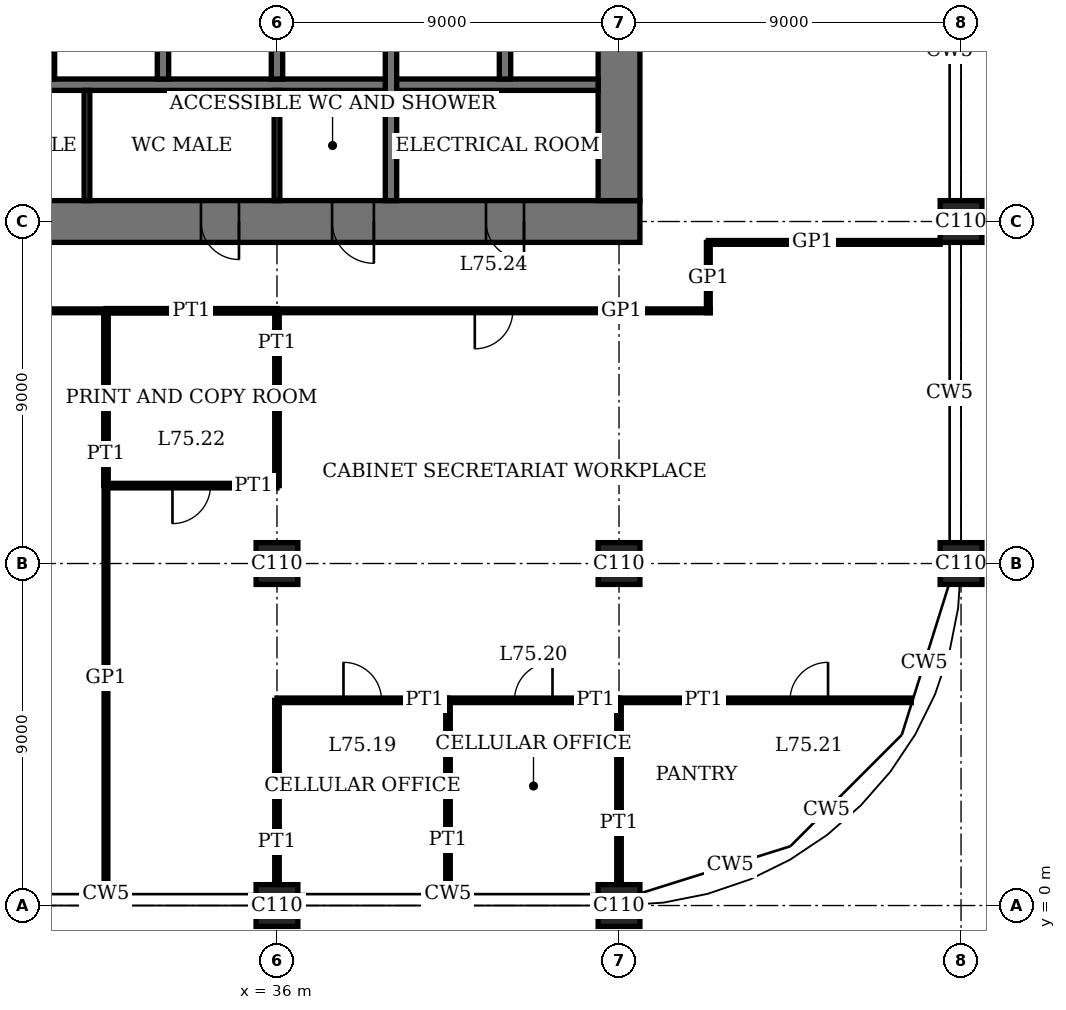
"""IFC4 building model, lengths in metres.
Left out: names, types, materials, properties, quantities, classifications, styles, units other than length and angle.
Written with IfcOpenShell. Run it as: python <this file> out.ifc"""

import sys

from ifc_helpers import new_model, si_unit, direction, frame, frame_2d, origin, origin_2d, place, context, subcontext, project, spatial, rectangle, extrude, element, fill, save


model = new_model("IFC4")
c1 = context("Model", 3, precision=1e-05, world=origin(), true_north=direction((0.0, 1.0)))
c2 = subcontext(c1, "Body", "Model", "MODEL_VIEW")
j1 = project(units=[si_unit("LENGTHUNIT", "METRE"), si_unit("PLANEANGLEUNIT", "RADIAN")], contexts=[c1])
p1 = place(None, origin())
s1 = spatial("IfcSite", under=j1, at=p1, CompositionType="ELEMENT")
p2 = place(p1, origin())
s2 = spatial("IfcBuilding", under=s1, at=p2, CompositionType="ELEMENT")
p3 = place(p2, frame((0.0, 0.0, 307.4)))
s3 = spatial("IfcBuildingStorey", under=s2, at=p3, CompositionType="ELEMENT", Elevation=307.4)
for number, where, z_axis, x_axis in (
    (1, (36.0, 0.0, 0.0), (0.0, 0.0, 1.0), (1.0, 0.0, 0.0)),
    (2, (36.0, 9.0, 0.0), (0.0, 0.0, 1.0), (1.0, 0.0, 0.0)),
    (3, (45.0, 0.0, 0.0), (0.0, 0.0, 1.0), (1.0, 0.0, 0.0)),
    (4, (45.0, 9.0, 0.0), (0.0, 0.0, 1.0), (1.0, 0.0, 0.0)),
    (5, (54.0, 9.0, 0.0), (0.0, 0.0, 1.0), (1.0, 0.0, 0.0)),
    (6, (54.0, 18.0, 0.0), (0.0, 0.0, 1.0), (1.0, 0.0, 0.0)),
):
    element("IfcColumn", number, at=place(p3, frame(where, z_axis=z_axis, x_axis=x_axis)), inside=s3, PredefinedType="COLUMN", context=c2, shape_type="SweptSolid", body=[
        extrude(rectangle(XDim=1.1, YDim=1.1, at=origin_2d()), origin(), (0.0, 0.0, 1.0), 4.4),
    ])
p4 = place(p3, frame((17.45, 18.0, 0.0), z_axis=(0.0, 0.0, 1.0), x_axis=(1.0, 0.0, 0.0)))
e7 = element("IfcWall", 7, at=p4, inside=s3, PredefinedType="SHEAR", context=c2, shape_type="SweptSolid", body=[
    extrude(rectangle(XDim=28.1, YDim=1.1, at=frame_2d((14.05, 0.0))), origin(), (0.0, 0.0, 1.0), 4.4),
])
p5 = place(p4, frame((11.55, 0.0, 0.0)))
e8 = element("IfcOpeningElement", 8, at=p5, cuts=e7, PredefinedType="OPENING", context=c2, shape_type="SweptSolid", body=[
    extrude(rectangle(XDim=1.0, YDim=2.4, at=frame_2d((0.5, 1.2))), frame((0.0, 0.56, 0.0), z_axis=(0.0, -1.0, 0.0), x_axis=(1.0, 0.0, 0.0)), (0.0, 0.0, 1.0), 1.12),
])
p6 = place(p4, frame((16.55, 0.0, 0.0)))
e9 = element("IfcOpeningElement", 9, at=p6, cuts=e7, PredefinedType="OPENING", context=c2, shape_type="SweptSolid", body=[
    extrude(rectangle(XDim=1.0, YDim=2.4, at=frame_2d((0.5, 1.2))), frame((0.0, 0.56, 0.0), z_axis=(0.0, -1.0, 0.0), x_axis=(1.0, 0.0, 0.0)), (0.0, 0.0, 1.0), 1.12),
])
p7 = place(p4, frame((20.0, 0.0, 0.0)))
e10 = element("IfcOpeningElement", 10, at=p7, cuts=e7, PredefinedType="OPENING", context=c2, shape_type="SweptSolid", body=[
    extrude(rectangle(XDim=1.1, YDim=2.4, at=frame_2d((0.55, 1.2))), frame((0.0, 0.56, 0.0), z_axis=(0.0, -1.0, 0.0), x_axis=(1.0, 0.0, 0.0)), (0.0, 0.0, 1.0), 1.12),
])
p8 = place(p4, frame((24.05, 0.0, 0.0)))
e11 = element("IfcOpeningElement", 11, at=p8, cuts=e7, PredefinedType="OPENING", context=c2, shape_type="SweptSolid", body=[
    extrude(rectangle(XDim=1.0, YDim=2.4, at=frame_2d((0.5, 1.2))), frame((0.0, 0.56, 0.0), z_axis=(0.0, -1.0, 0.0), x_axis=(1.0, 0.0, 0.0)), (0.0, 0.0, 1.0), 1.12),
])
p9 = place(p3, frame((45.0, 18.55, 0.0), z_axis=(0.0, 0.0, 1.0), x_axis=(0.0, 1.0, 0.0)))
e12 = element("IfcWall", 12, at=p9, inside=s3, PredefinedType="SHEAR", context=c2, shape_type="SweptSolid", body=[
    extrude(rectangle(XDim=16.9, YDim=1.1, at=frame_2d((8.45, 0.0))), origin(), (0.0, 0.0, 1.0), 4.4),
])
p10 = place(p9, frame((8.45, 0.0, 0.0)))
e13 = element("IfcOpeningElement", 13, at=p10, cuts=e12, PredefinedType="OPENING", context=c2, shape_type="SweptSolid", body=[
    extrude(rectangle(XDim=1.8, YDim=2.4, at=frame_2d((0.9, 1.2))), frame((0.0, 0.56, 0.0), z_axis=(0.0, -1.0, 0.0), x_axis=(1.0, 0.0, 0.0)), (0.0, 0.0, 1.0), 1.12),
])
p11 = place(p3, frame((27.15, 21.6, 0.0), z_axis=(0.0, 0.0, 1.0), x_axis=(1.0, 0.0, 0.0)))
e14 = element("IfcWall", 14, at=p11, inside=s3, PredefinedType="SHEAR", context=c2, shape_type="SweptSolid", body=[
    extrude(rectangle(XDim=17.3, YDim=0.3, at=frame_2d((8.65, 0.0))), origin(), (0.0, 0.0, 1.0), 4.4),
])
for number, where, z_axis, x_axis in (
    (15, (30.0, 21.75, 0.0), (0.0, 0.0, 1.0), (0.0, 1.0, 0.0)),
    (16, (33.0, 21.75, 0.0), (0.0, 0.0, 1.0), (0.0, 1.0, 0.0)),
    (17, (36.0, 21.75, 0.0), (0.0, 0.0, 1.0), (0.0, 1.0, 0.0)),
):
    element("IfcWall", number, at=place(p3, frame(where, z_axis=z_axis, x_axis=x_axis)), inside=s3, PredefinedType="SHEAR", context=c2, shape_type="SweptSolid", body=[
        extrude(rectangle(XDim=2.7, YDim=0.3, at=frame_2d((1.35, 0.0))), origin(), (0.0, 0.0, 1.0), 4.4),
    ])
p12 = place(p3, frame((39.0, 18.55, 0.0), z_axis=(0.0, 0.0, 1.0), x_axis=(0.0, 1.0, 0.0)))
e18 = element("IfcWall", 18, at=p12, inside=s3, PredefinedType="SHEAR", context=c2, shape_type="SweptSolid", body=[
    extrude(rectangle(XDim=5.9, YDim=0.3, at=frame_2d((2.95, 0.0))), origin(), (0.0, 0.0, 1.0), 4.4),
])
p13 = place(p3, frame((42.0, 21.75, 0.0), z_axis=(0.0, 0.0, 1.0), x_axis=(0.0, 1.0, 0.0)))
e19 = element("IfcWall", 19, at=p13, inside=s3, PredefinedType="SHEAR", context=c2, shape_type="SweptSolid", body=[
    extrude(rectangle(XDim=2.7, YDim=0.3, at=frame_2d((1.35, 0.0))), origin(), (0.0, 0.0, 1.0), 4.4),
])
p14 = place(p3, frame((36.0, 5.4, 0.0), z_axis=(0.0, 0.0, 1.0), x_axis=(1.0, 0.0, 0.0)))
e20 = element("IfcWall", 20, at=p14, inside=s3, PredefinedType="PARTITIONING", context=c2, shape_type="SweptSolid", body=[
    extrude(rectangle(XDim=4.5, YDim=0.12, at=frame_2d((2.25, 0.0))), origin(), (0.0, 0.0, 1.0), 4.05),
])
p15 = place(p14, frame((1.75, 0.0, 0.0)))
e21 = element("IfcOpeningElement", 21, at=p15, cuts=e20, PredefinedType="OPENING", context=c2, shape_type="SweptSolid", body=[
    extrude(rectangle(XDim=1.0, YDim=2.4, at=frame_2d((0.5, 1.2))), frame((0.0, 0.07, 0.0), z_axis=(0.0, -1.0, 0.0), x_axis=(1.0, 0.0, 0.0)), (0.0, 0.0, 1.0), 0.14),
])
p16 = place(p3, frame((40.5, 5.4, 0.0), z_axis=(0.0, 0.0, 1.0), x_axis=(1.0, 0.0, 0.0)))
e22 = element("IfcWall", 22, at=p16, inside=s3, PredefinedType="PARTITIONING", context=c2, shape_type="SweptSolid", body=[
    extrude(rectangle(XDim=4.5, YDim=0.12, at=frame_2d((2.25, 0.0))), origin(), (0.0, 0.0, 1.0), 4.05),
])
p17 = place(p16, frame((1.75, 0.0, 0.0)))
e23 = element("IfcOpeningElement", 23, at=p17, cuts=e22, PredefinedType="OPENING", context=c2, shape_type="SweptSolid", body=[
    extrude(rectangle(XDim=1.0, YDim=2.4, at=frame_2d((0.5, 1.2))), frame((0.0, 0.07, 0.0), z_axis=(0.0, -1.0, 0.0), x_axis=(1.0, 0.0, 0.0)), (0.0, 0.0, 1.0), 0.14),
])
p18 = place(p3, frame((45.0, 5.4, 0.0), z_axis=(0.0, 0.0, 1.0), x_axis=(1.0, 0.0, 0.0)))
e24 = element("IfcWall", 24, at=p18, inside=s3, PredefinedType="PARTITIONING", context=c2, shape_type="SweptSolid", body=[
    extrude(rectangle(XDim=7.69, YDim=0.12, at=frame_2d((3.845, 0.0))), origin(), (0.0, 0.0, 1.0), 4.05),
])
p19 = place(p18, frame((4.5, 0.0, 0.0)))
e25 = element("IfcOpeningElement", 25, at=p19, cuts=e24, PredefinedType="OPENING", context=c2, shape_type="SweptSolid", body=[
    extrude(rectangle(XDim=1.0, YDim=2.4, at=frame_2d((0.5, 1.2))), frame((0.0, 0.07, 0.0), z_axis=(0.0, -1.0, 0.0), x_axis=(1.0, 0.0, 0.0)), (0.0, 0.0, 1.0), 0.14),
])
p20 = place(p3, frame((31.5, 11.05, 0.0), z_axis=(0.0, 0.0, 1.0), x_axis=(1.0, 0.0, 0.0)))
e26 = element("IfcWall", 26, at=p20, inside=s3, PredefinedType="PARTITIONING", context=c2, shape_type="SweptSolid", body=[
    extrude(rectangle(XDim=4.5, YDim=0.12, at=frame_2d((2.25, 0.0))), origin(), (0.0, 0.0, 1.0), 4.05),
])
p21 = place(p20, frame((1.75, 0.0, 0.0)))
e27 = element("IfcOpeningElement", 27, at=p21, cuts=e26, PredefinedType="OPENING", context=c2, shape_type="SweptSolid", body=[
    extrude(rectangle(XDim=1.0, YDim=2.4, at=frame_2d((0.5, 1.2))), frame((0.0, 0.07, 0.0), z_axis=(0.0, -1.0, 0.0), x_axis=(1.0, 0.0, 0.0)), (0.0, 0.0, 1.0), 0.14),
])
p22 = place(p3, frame((31.5, 15.65, 0.0), z_axis=(0.0, 0.0, 1.0), x_axis=(1.0, 0.0, 0.0)))
e28 = element("IfcWall", 28, at=p22, inside=s3, PredefinedType="PARTITIONING", context=c2, shape_type="SweptSolid", body=[
    extrude(rectangle(XDim=4.5, YDim=0.12, at=frame_2d((2.25, 0.0))), origin(), (0.0, 0.0, 1.0), 4.05),
])
p23 = place(p3, frame((15.6, 15.65, 0.0), z_axis=(0.0, 0.0, 1.0), x_axis=(1.0, 0.0, 0.0)))
e29 = element("IfcWall", 29, at=p23, inside=s3, PredefinedType="PARTITIONING", context=c2, shape_type="SweptSolid", body=[
    extrude(rectangle(XDim=15.89, YDim=0.1, at=frame_2d((7.945, 0.0))), origin(), (0.0, 0.0, 1.0), 4.05),
])
p24 = place(p23, frame((7.445, 0.0, 0.0)))
e30 = element("IfcOpeningElement", 30, at=p24, cuts=e29, PredefinedType="OPENING", context=c2, shape_type="SweptSolid", body=[
    extrude(rectangle(XDim=1.0, YDim=2.4, at=frame_2d((0.5, 1.2))), frame((0.0, 0.06, 0.0), z_axis=(0.0, -1.0, 0.0), x_axis=(1.0, 0.0, 0.0)), (0.0, 0.0, 1.0), 0.12),
])
p25 = place(p3, frame((36.01, 15.65, 0.0), z_axis=(0.0, 0.0, 1.0), x_axis=(1.0, 0.0, 0.0)))
e31 = element("IfcWall", 31, at=p25, inside=s3, PredefinedType="PARTITIONING", context=c2, shape_type="SweptSolid", body=[
    extrude(rectangle(XDim=11.39, YDim=0.1, at=frame_2d((5.695, 0.0))), origin(), (0.0, 0.0, 1.0), 4.05),
])
p26 = place(p25, frame((5.195, 0.0, 0.0)))
e32 = element("IfcOpeningElement", 32, at=p26, cuts=e31, PredefinedType="OPENING", context=c2, shape_type="SweptSolid", body=[
    extrude(rectangle(XDim=1.0, YDim=2.4, at=frame_2d((0.5, 1.2))), frame((0.0, 0.06, 0.0), z_axis=(0.0, -1.0, 0.0), x_axis=(1.0, 0.0, 0.0)), (0.0, 0.0, 1.0), 0.12),
])
p27 = place(p3, frame((47.35, 17.45, 0.0), z_axis=(0.0, 0.0, 1.0), x_axis=(1.0, 0.0, 0.0)))
e33 = element("IfcWall", 33, at=p27, inside=s3, PredefinedType="PARTITIONING", context=c2, shape_type="SweptSolid", body=[
    extrude(rectangle(XDim=6.1, YDim=0.1, at=frame_2d((3.05, 0.0))), origin(), (0.0, 0.0, 1.0), 4.05),
])
p28 = place(p3, frame((31.5, 11.05, 0.0), z_axis=(0.0, 0.0, 1.0), x_axis=(0.0, 1.0, 0.0)))
e34 = element("IfcWall", 34, at=p28, inside=s3, PredefinedType="PARTITIONING", context=c2, shape_type="SweptSolid", body=[
    extrude(rectangle(XDim=4.6, YDim=0.12, at=frame_2d((2.3, 0.0))), origin(), (0.0, 0.0, 1.0), 4.05),
])
p29 = place(p3, frame((31.5, 0.31, 0.0), z_axis=(0.0, 0.0, 1.0), x_axis=(0.0, 1.0, 0.0)))
e35 = element("IfcWall", 35, at=p29, inside=s3, PredefinedType="PARTITIONING", context=c2, shape_type="SweptSolid", body=[
    extrude(rectangle(XDim=10.74, YDim=0.1, at=frame_2d((5.37, 0.0))), origin(), (0.0, 0.0, 1.0), 4.05),
])
p30 = place(p3, frame((36.0, 0.55, 0.0), z_axis=(0.0, 0.0, 1.0), x_axis=(0.0, 1.0, 0.0)))
e36 = element("IfcWall", 36, at=p30, inside=s3, PredefinedType="PARTITIONING", context=c2, shape_type="SweptSolid", body=[
    extrude(rectangle(XDim=4.85, YDim=0.12, at=frame_2d((2.425, 0.0))), origin(), (0.0, 0.0, 1.0), 3.25),
])
p31 = place(p3, frame((36.0, 11.05, 0.0), z_axis=(0.0, 0.0, 1.0), x_axis=(0.0, 1.0, 0.0)))
e37 = element("IfcWall", 37, at=p31, inside=s3, PredefinedType="PARTITIONING", context=c2, shape_type="SweptSolid", body=[
    extrude(rectangle(XDim=4.6, YDim=0.12, at=frame_2d((2.3, 0.0))), origin(), (0.0, 0.0, 1.0), 3.25),
])
p32 = place(p3, frame((40.5, 0.31, 0.0), z_axis=(0.0, 0.0, 1.0), x_axis=(0.0, 1.0, 0.0)))
e38 = element("IfcWall", 38, at=p32, inside=s3, PredefinedType="PARTITIONING", context=c2, shape_type="SweptSolid", body=[
    extrude(rectangle(XDim=5.09, YDim=0.12, at=frame_2d((2.545, 0.0))), origin(), (0.0, 0.0, 1.0), 4.05),
])
p33 = place(p3, frame((45.0, 0.55, 0.0), z_axis=(0.0, 0.0, 1.0), x_axis=(0.0, 1.0, 0.0)))
e39 = element("IfcWall", 39, at=p33, inside=s3, PredefinedType="PARTITIONING", context=c2, shape_type="SweptSolid", body=[
    extrude(rectangle(XDim=4.85, YDim=0.12, at=frame_2d((2.425, 0.0))), origin(), (0.0, 0.0, 1.0), 3.25),
])
p34 = place(p3, frame((47.35, 15.6, 0.0), z_axis=(0.0, 0.0, 1.0), x_axis=(0.0, 1.0, 0.0)))
e40 = element("IfcWall", 40, at=p34, inside=s3, PredefinedType="PARTITIONING", context=c2, shape_type="SweptSolid", body=[
    extrude(rectangle(XDim=1.85, YDim=0.1, at=frame_2d((0.925, 0.0))), origin(), (0.0, 0.0, 1.0), 4.05),
])
for number, where, z_axis, x_axis in (
    (41, (31.0, 18.55, 0.0), (0.0, 0.0, 1.0), (0.0, 1.0, 0.0)),
    (42, (36.0, 18.55, 0.0), (0.0, 0.0, 1.0), (0.0, 1.0, 0.0)),
):
    element("IfcWall", number, at=place(p3, frame(where, z_axis=z_axis, x_axis=x_axis)), inside=s3, PredefinedType="PARTITIONING", context=c2, shape_type="SweptSolid", body=[
        extrude(rectangle(XDim=2.9, YDim=0.15, at=frame_2d((1.45, 0.0))), origin(), (0.0, 0.0, 1.0), 4.05),
    ])
p35 = place(p6, origin())
e43 = element("IfcDoor", 43, at=p35, inside=s3, OperationType="SINGLE_SWING_RIGHT", PredefinedType="DOOR", context=c2, shape_type="SweptSolid", body=[
    extrude(rectangle(XDim=1.0, YDim=2.4, at=frame_2d((0.5, 1.2))), frame((0.0, 0.025, 0.0), z_axis=(0.0, -1.0, 0.0), x_axis=(1.0, 0.0, 0.0)), (0.0, 0.0, 1.0), 0.05),
    extrude(rectangle(XDim=0.04, YDim=2.4, at=frame_2d((0.02, 1.2))), frame((0.0, 0.4, 0.0), z_axis=(0.0, -1.0, 0.0), x_axis=(1.0, 0.0, 0.0)), (0.0, 0.0, 1.0), 0.8),
    extrude(rectangle(XDim=0.04, YDim=2.4, at=frame_2d((0.98, 1.2))), frame((0.0, 0.4, 0.0), z_axis=(0.0, -1.0, 0.0), x_axis=(1.0, 0.0, 0.0)), (0.0, 0.0, 1.0), 0.8),
    extrude(rectangle(XDim=1.0, YDim=0.04, at=frame_2d((0.5, 2.38))), frame((0.0, 0.4, 0.0), z_axis=(0.0, -1.0, 0.0), x_axis=(1.0, 0.0, 0.0)), (0.0, 0.0, 1.0), 0.8),
])
fill(e9, e43)
p36 = place(p7, origin())
e44 = element("IfcDoor", 44, at=p36, inside=s3, OperationType="SINGLE_SWING_RIGHT", PredefinedType="DOOR", context=c2, shape_type="SweptSolid", body=[
    extrude(rectangle(XDim=1.1, YDim=2.4, at=frame_2d((0.55, 1.2))), frame((0.0, 0.025, 0.0), z_axis=(0.0, -1.0, 0.0), x_axis=(1.0, 0.0, 0.0)), (0.0, 0.0, 1.0), 0.05),
    extrude(rectangle(XDim=0.04, YDim=2.4, at=frame_2d((0.02, 1.2))), frame((0.0, 0.44, 0.0), z_axis=(0.0, -1.0, 0.0), x_axis=(1.0, 0.0, 0.0)), (0.0, 0.0, 1.0), 0.88),
    extrude(rectangle(XDim=0.04, YDim=2.4, at=frame_2d((1.08, 1.2))), frame((0.0, 0.44, 0.0), z_axis=(0.0, -1.0, 0.0), x_axis=(1.0, 0.0, 0.0)), (0.0, 0.0, 1.0), 0.88),
    extrude(rectangle(XDim=1.1, YDim=0.04, at=frame_2d((0.55, 2.38))), frame((0.0, 0.44, 0.0), z_axis=(0.0, -1.0, 0.0), x_axis=(1.0, 0.0, 0.0)), (0.0, 0.0, 1.0), 0.88),
])
fill(e10, e44)
p37 = place(p8, origin())
e45 = element("IfcDoor", 45, at=p37, inside=s3, OperationType="SINGLE_SWING_RIGHT", PredefinedType="DOOR", context=c2, shape_type="SweptSolid", body=[
    extrude(rectangle(XDim=1.0, YDim=2.4, at=frame_2d((0.5, 1.2))), frame((0.0, 0.025, 0.0), z_axis=(0.0, -1.0, 0.0), x_axis=(1.0, 0.0, 0.0)), (0.0, 0.0, 1.0), 0.05),
    extrude(rectangle(XDim=0.04, YDim=2.4, at=frame_2d((0.02, 1.2))), frame((0.0, 0.4, 0.0), z_axis=(0.0, -1.0, 0.0), x_axis=(1.0, 0.0, 0.0)), (0.0, 0.0, 1.0), 0.8),
    extrude(rectangle(XDim=0.04, YDim=2.4, at=frame_2d((0.98, 1.2))), frame((0.0, 0.4, 0.0), z_axis=(0.0, -1.0, 0.0), x_axis=(1.0, 0.0, 0.0)), (0.0, 0.0, 1.0), 0.8),
    extrude(rectangle(XDim=1.0, YDim=0.04, at=frame_2d((0.5, 2.38))), frame((0.0, 0.4, 0.0), z_axis=(0.0, -1.0, 0.0), x_axis=(1.0, 0.0, 0.0)), (0.0, 0.0, 1.0), 0.8),
])
fill(e11, e45)
p38 = place(p15, origin())
e46 = element("IfcDoor", 46, at=p38, inside=s3, OperationType="SINGLE_SWING_RIGHT", PredefinedType="DOOR", context=c2, shape_type="SweptSolid", body=[
    extrude(rectangle(XDim=1.0, YDim=2.4, at=frame_2d((0.5, 1.2))), frame((0.0, 0.025, 0.0), z_axis=(0.0, -1.0, 0.0), x_axis=(1.0, 0.0, 0.0)), (0.0, 0.0, 1.0), 0.05),
])
fill(e21, e46)
p39 = place(p17, origin())
e47 = element("IfcDoor", 47, at=p39, inside=s3, OperationType="SINGLE_SWING_LEFT", PredefinedType="DOOR", context=c2, shape_type="SweptSolid", body=[
    extrude(rectangle(XDim=1.0, YDim=2.4, at=frame_2d((0.5, 1.2))), frame((0.0, 0.025, 0.0), z_axis=(0.0, -1.0, 0.0), x_axis=(1.0, 0.0, 0.0)), (0.0, 0.0, 1.0), 0.05),
])
fill(e23, e47)
p40 = place(p19, origin())
e48 = element("IfcDoor", 48, at=p40, inside=s3, OperationType="SINGLE_SWING_LEFT", PredefinedType="DOOR", context=c2, shape_type="SweptSolid", body=[
    extrude(rectangle(XDim=1.0, YDim=2.4, at=frame_2d((0.5, 1.2))), frame((0.0, 0.025, 0.0), z_axis=(0.0, -1.0, 0.0), x_axis=(1.0, 0.0, 0.0)), (0.0, 0.0, 1.0), 0.05),
])
fill(e25, e48)
p41 = place(p21, origin())
e49 = element("IfcDoor", 49, at=p41, inside=s3, OperationType="SINGLE_SWING_LEFT", PredefinedType="DOOR", context=c2, shape_type="SweptSolid", body=[
    extrude(rectangle(XDim=1.0, YDim=2.4, at=frame_2d((0.5, 1.2))), frame((0.0, 0.025, 0.0), z_axis=(0.0, -1.0, 0.0), x_axis=(1.0, 0.0, 0.0)), (0.0, 0.0, 1.0), 0.05),
])
fill(e27, e49)
p42 = place(p26, origin())
e50 = element("IfcDoor", 50, at=p42, inside=s3, OperationType="SINGLE_SWING_LEFT", PredefinedType="DOOR", context=c2, shape_type="SweptSolid", body=[
    extrude(rectangle(XDim=1.0, YDim=2.4, at=frame_2d((0.5, 1.2))), frame((0.0, 0.02, 0.0), z_axis=(0.0, -1.0, 0.0), x_axis=(1.0, 0.0, 0.0)), (0.0, 0.0, 1.0), 0.04),
])
fill(e32, e50)
save(model, sys.argv[1])
